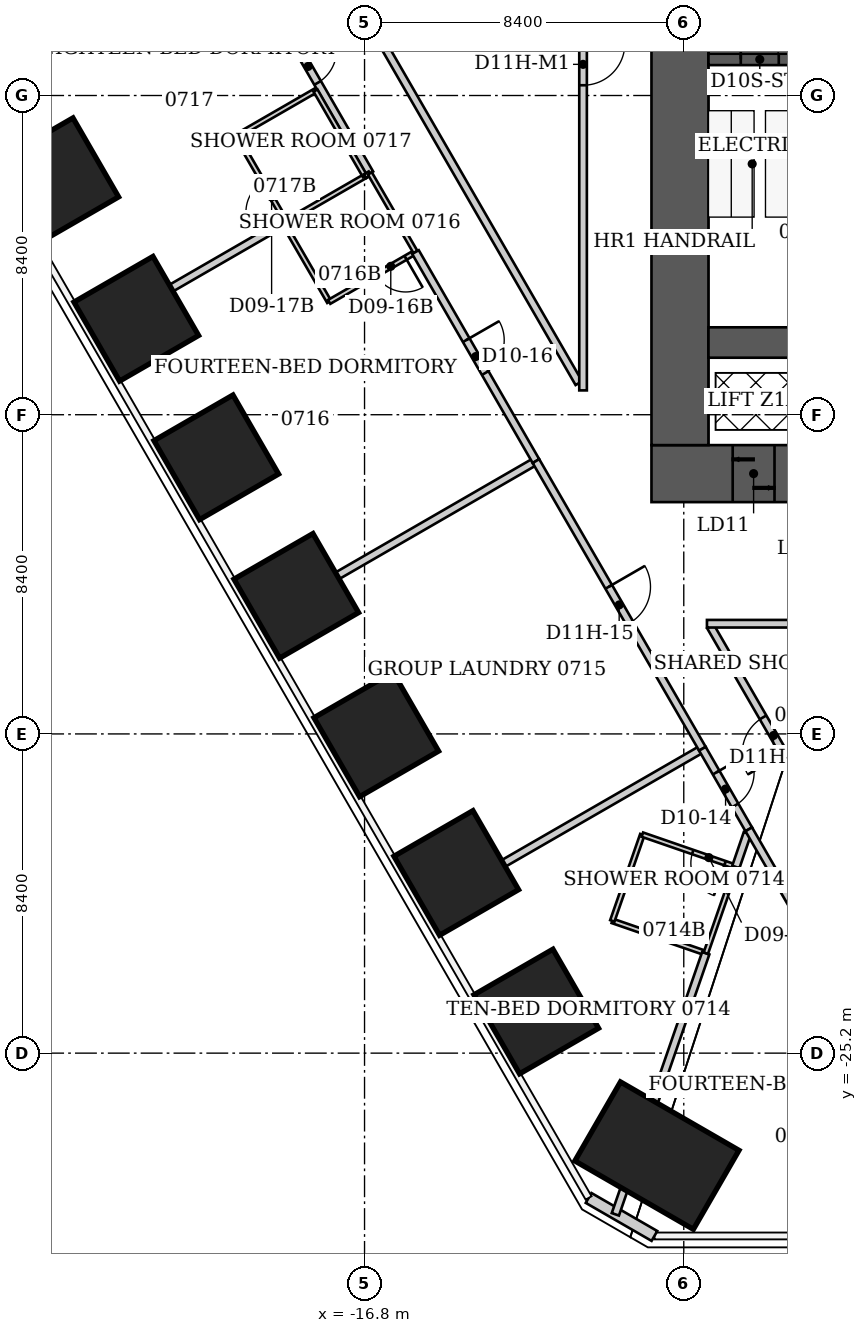
"""IFC4 building model, lengths in metres.
Left out: names, types, materials, properties, quantities, classifications, styles, units other than length and angle.
Written with IfcOpenShell. Run it as: python <this file> out.ifc"""

import sys

from ifc_helpers import new_model, si_unit, direction, frame, frame_2d, origin, origin_2d, place, context, subcontext, project, spatial, rectangle, extrude, element, fill, save


model = new_model("IFC4")
c1 = context("Model", 3, precision=1e-05, world=origin(), true_north=direction((0.0, 1.0)))
c2 = subcontext(c1, "Body", "Model", "MODEL_VIEW")
j1 = project(units=[si_unit("LENGTHUNIT", "METRE"), si_unit("PLANEANGLEUNIT", "RADIAN")], contexts=[c1])
p1 = place(None, origin())
s1 = spatial("IfcSite", under=j1, at=p1, CompositionType="ELEMENT")
p2 = place(p1, origin())
s2 = spatial("IfcBuilding", under=s1, at=p2, CompositionType="ELEMENT")
p3 = place(p2, frame((0.0, 0.0, 34.4)))
s3 = spatial("IfcBuildingStorey", under=s2, at=p3, CompositionType="ELEMENT", Elevation=34.4)
p4 = place(p3, frame((-9.106, -27.897, 0.0), z_axis=(0.0, 0.0, 1.0), x_axis=(-0.5, -0.866025403784, 0.0)))
e1 = element("IfcColumn", 1, at=p4, inside=s3, PredefinedType="COLUMN", context=c2, shape_type="SweptSolid", body=[
    extrude(rectangle(XDim=2.4, YDim=3.6, at=origin_2d()), origin(), (0.0, 0.0, 1.0), 3.8),
])
for number, where, z_axis, x_axis in (
    (2, (-12.282, -24.105, 0.0), (0.0, 0.0, 1.0), (-0.866, -0.5, 0.0)),
    (3, (-14.387, -20.459, 0.0), (0.0, 0.0, 1.0), (-0.866, -0.5, 0.0)),
    (4, (-16.491, -16.813, 0.0), (0.0, 0.0, 1.0), (-0.866, -0.5, 0.0)),
    (5, (-18.596, -13.167, 0.0), (0.0, 0.0, 1.0), (-0.866, -0.5, 0.0)),
    (6, (-20.701, -9.521, 0.0), (0.0, 0.0, 1.0), (-0.866, -0.5, 0.0)),
    (7, (-22.806, -5.875, 0.0), (0.0, 0.0, 1.0), (-0.866, -0.5, 0.0)),
    (8, (-24.911, -2.23, 0.0), (0.0, 0.0, 1.0), (-0.866, -0.5, 0.0)),
):
    element("IfcColumn", number, at=place(p3, frame(where, z_axis=z_axis, x_axis=x_axis)), inside=s3, PredefinedType="COLUMN", context=c2, shape_type="SweptSolid", body=[
        extrude(rectangle(XDim=2.4, YDim=2.4, at=origin_2d()), origin(), (0.0, 0.0, 1.0), 3.8),
    ])
p5 = place(p3, frame((-9.25, -9.95, 0.0), z_axis=(0.0, 0.0, 1.0), x_axis=(1.0, 0.0, 0.0)))
e9 = element("IfcWall", 9, at=p5, inside=s3, PredefinedType="SHEAR", context=c2, shape_type="SweptSolid", body=[
    extrude(rectangle(XDim=18.5, YDim=1.5, at=frame_2d((9.25, 0.0))), origin(), (0.0, 0.0, 1.0), 3.8),
])
p6 = place(p5, frame((2.137, 0.0, 0.0)))
e10 = element("IfcOpeningElement", 10, at=p6, cuts=e9, PredefinedType="OPENING", context=c2, shape_type="SweptSolid", body=[
    extrude(rectangle(XDim=1.1, YDim=2.1, at=frame_2d((0.55, 1.05))), frame((0.0, 0.75, 0.0), z_axis=(0.0, -1.0, 0.0), x_axis=(1.0, 0.0, 0.0)), (0.0, 0.0, 1.0), 1.5),
])
p7 = place(p5, frame((4.762, 0.0, 0.0)))
e11 = element("IfcOpeningElement", 11, at=p7, cuts=e9, PredefinedType="OPENING", context=c2, shape_type="SweptSolid", body=[
    extrude(rectangle(XDim=1.1, YDim=2.1, at=frame_2d((0.55, 1.05))), frame((0.0, 0.75, 0.0), z_axis=(0.0, -1.0, 0.0), x_axis=(1.0, 0.0, 0.0)), (0.0, 0.0, 1.0), 1.5),
])
p8 = place(p5, frame((7.387, 0.0, 0.0)))
e12 = element("IfcOpeningElement", 12, at=p8, cuts=e9, PredefinedType="OPENING", context=c2, shape_type="SweptSolid", body=[
    extrude(rectangle(XDim=1.1, YDim=2.1, at=frame_2d((0.55, 1.05))), frame((0.0, 0.75, 0.0), z_axis=(0.0, -1.0, 0.0), x_axis=(1.0, 0.0, 0.0)), (0.0, 0.0, 1.0), 1.5),
])
p9 = place(p3, frame((-8.5, -9.2, 0.0), z_axis=(0.0, 0.0, 1.0), x_axis=(0.0, 1.0, 0.0)))
e13 = element("IfcWall", 13, at=p9, inside=s3, PredefinedType="SHEAR", context=c2, shape_type="SweptSolid", body=[
    extrude(rectangle(XDim=15.3, YDim=1.5, at=frame_2d((7.65, 0.0))), origin(), (0.0, 0.0, 1.0), 3.8),
])
p10 = place(p9, frame((10.7, 0.0, 0.0)))
e14 = element("IfcOpeningElement", 14, at=p10, cuts=e13, PredefinedType="OPENING", context=c2, shape_type="SweptSolid", body=[
    extrude(rectangle(XDim=1.2, YDim=2.2, at=frame_2d((0.6, 1.1))), frame((0.0, 0.75, 0.0), z_axis=(0.0, -1.0, 0.0), x_axis=(1.0, 0.0, 0.0)), (0.0, 0.0, 1.0), 1.5),
])
p11 = place(p3, frame((-7.75, -6.5, 0.0), z_axis=(0.0, 0.0, 1.0), x_axis=(1.0, 0.0, 0.0)))
e15 = element("IfcWall", 15, at=p11, inside=s3, PredefinedType="SHEAR", context=c2, shape_type="SweptSolid", body=[
    extrude(rectangle(XDim=15.5, YDim=0.8, at=frame_2d((7.75, 0.0))), origin(), (0.0, 0.0, 1.0), 3.8),
])
p12 = place(p3, frame((-7.75, 0.95, 0.0), z_axis=(0.0, 0.0, 1.0), x_axis=(1.0, 0.0, 0.0)))
e16 = element("IfcWall", 16, at=p12, inside=s3, PredefinedType="SHEAR", context=c2, shape_type="SweptSolid", body=[
    extrude(rectangle(XDim=3.0, YDim=0.3, at=frame_2d((1.5, 0.0))), origin(), (0.0, 0.0, 1.0), 3.8),
])
p13 = place(p12, frame((0.85, 0.0, 0.0)))
e17 = element("IfcOpeningElement", 17, at=p13, cuts=e16, PredefinedType="OPENING", context=c2, shape_type="SweptSolid", body=[
    extrude(rectangle(XDim=1.0, YDim=2.2, at=frame_2d((0.5, 1.1))), frame((0.0, 0.15, 0.0), z_axis=(0.0, -1.0, 0.0), x_axis=(1.0, 0.0, 0.0)), (0.0, 0.0, 1.0), 0.3),
])
p14 = place(p3, frame((-9.172, -30.011, 0.0), z_axis=(0.0, 0.0, 1.0), x_axis=(-0.866010750942, 0.50002537861, 0.0)))
e18 = element("IfcWall", 18, at=p14, inside=s3, PredefinedType="SOLIDWALL", context=c2, shape_type="SweptSolid", body=[
    extrude(rectangle(XDim=2.0, YDim=0.3, at=frame_2d((1.0, 0.0))), origin(), (0.0, 0.0, 1.0), 3.64),
])
p15 = place(p3, frame((-23.916, -6.24, 0.0), z_axis=(0.0, 0.0, 1.0), x_axis=(0.865919350456, 0.50018364478, 0.0)))
e19 = element("IfcWall", 19, at=p15, inside=s3, PredefinedType="PARTITIONING", context=c2, shape_type="SweptSolid", body=[
    extrude(rectangle(XDim=5.758, YDim=0.2, at=frame_2d((2.879, 0.0))), origin(), (0.0, 0.0, 1.0), 3.64),
])
p16 = place(p3, frame((-20.17, -1.07, 0.0), z_axis=(0.0, 0.0, 1.0), x_axis=(0.500291685314, -0.865856933682, 0.0)))
e20 = element("IfcWall", 20, at=p16, inside=s3, PredefinedType="PARTITIONING", context=c2, shape_type="SweptSolid", body=[
    extrude(rectangle(XDim=2.599, YDim=0.12, at=frame_2d((1.299, 0.0))), origin(), (0.0, 0.0, 1.0), 3.64),
])
p17 = place(p16, frame((1.399, 0.0, 0.0)))
e21 = element("IfcOpeningElement", 21, at=p17, cuts=e20, PredefinedType="OPENING", context=c2, shape_type="SweptSolid", body=[
    extrude(rectangle(XDim=0.9, YDim=2.03, at=frame_2d((0.45, 1.015))), frame((0.0, 0.06, 0.0), z_axis=(0.0, -1.0, 0.0), x_axis=(1.0, 0.0, 0.0)), (0.0, 0.0, 1.0), 0.12),
])
p18 = place(p3, frame((-19.61, 3.06, 0.0), z_axis=(0.0, 0.0, 1.0), x_axis=(0.499983910424, -0.866034692906, 0.0)))
e22 = element("IfcWall", 22, at=p18, inside=s3, PredefinedType="PARTITIONING", context=c2, shape_type="SweptSolid", body=[
    extrude(rectangle(XDim=5.901, YDim=0.2, at=frame_2d((2.95, 0.0))), origin(), (0.0, 0.0, 1.0), 3.64),
])
p19 = place(p18, frame((2.15, 0.0, 0.0)))
e23 = element("IfcOpeningElement", 23, at=p19, cuts=e22, PredefinedType="OPENING", context=c2, shape_type="SweptSolid", body=[
    extrude(rectangle(XDim=1.0, YDim=2.13, at=frame_2d((0.5, 1.065))), frame((0.0, 0.1, 0.0), z_axis=(0.0, -1.0, 0.0), x_axis=(1.0, 0.0, 0.0)), (0.0, 0.0, 1.0), 0.2),
])
p20 = place(p3, frame((-19.546, -13.81, 0.0), z_axis=(0.0, 0.0, 1.0), x_axis=(0.86599028666, 0.500060819711, 0.0)))
e24 = element("IfcWall", 24, at=p20, inside=s3, PredefinedType="PARTITIONING", context=c2, shape_type="SweptSolid", body=[
    extrude(rectangle(XDim=8.369, YDim=0.2, at=frame_2d((4.185, 0.0))), origin(), (0.0, 0.0, 1.0), 3.038),
])
p21 = place(p3, frame((-18.93, -3.36, 0.0), z_axis=(0.0, 0.0, 1.0), x_axis=(0.501547039172, -0.865130376012, 0.0)))
e25 = element("IfcWall", 25, at=p21, inside=s3, PredefinedType="PARTITIONING", context=c2, shape_type="SweptSolid", body=[
    extrude(rectangle(XDim=2.393, YDim=0.12, at=frame_2d((1.196, 0.0))), origin(), (0.0, 0.0, 1.0), 3.64),
])
p22 = place(p3, frame((-18.868, -3.324, 0.0), z_axis=(0.0, 0.0, 1.0), x_axis=(0.866133109688, 0.499813401482, 0.0)))
e26 = element("IfcWall", 26, at=p22, inside=s3, PredefinedType="PARTITIONING", context=c2, shape_type="SweptSolid", body=[
    extrude(rectangle(XDim=2.401, YDim=0.12, at=frame_2d((1.201, 0.0))), origin(), (0.0, 0.0, 1.0), 3.64),
])
p23 = place(p3, frame((-18.09, 0.13, 0.0), z_axis=(0.0, 0.0, 1.0), x_axis=(-0.866177122335, -0.499737123639, 0.0)))
e27 = element("IfcWall", 27, at=p23, inside=s3, PredefinedType="PARTITIONING", context=c2, shape_type="SweptSolid", body=[
    extrude(rectangle(XDim=2.401, YDim=0.12, at=frame_2d((1.201, 0.0))), origin(), (0.0, 0.0, 1.0), 3.64),
])
p24 = place(p3, frame((-17.73, -5.43, 0.0), z_axis=(0.0, 0.0, 1.0), x_axis=(0.866114241029, 0.499846097802, 0.0)))
e28 = element("IfcWall", 28, at=p24, inside=s3, PredefinedType="PARTITIONING", context=c2, shape_type="SweptSolid", body=[
    extrude(rectangle(XDim=2.621, YDim=0.12, at=frame_2d((1.311, 0.0))), origin(), (0.0, 0.0, 1.0), 2.878),
])
p25 = place(p24, frame((1.421, 0.0, 0.0)))
e29 = element("IfcOpeningElement", 29, at=p25, cuts=e28, PredefinedType="OPENING", context=c2, shape_type="SweptSolid", body=[
    extrude(rectangle(XDim=0.9, YDim=2.03, at=frame_2d((0.45, 1.015))), frame((0.0, 0.06, 0.0), z_axis=(0.0, -1.0, 0.0), x_axis=(1.0, 0.0, 0.0)), (0.0, 0.0, 1.0), 0.12),
])
p26 = place(p3, frame((-16.79, -2.12, 0.0), z_axis=(0.0, 0.0, 1.0), x_axis=(-0.50025099007, 0.865880446098, 0.0)))
e30 = element("IfcWall", 30, at=p26, inside=s3, PredefinedType="PARTITIONING", context=c2, shape_type="SweptSolid", body=[
    extrude(rectangle(XDim=2.599, YDim=0.12, at=frame_2d((1.299, 0.0))), origin(), (0.0, 0.0, 1.0), 3.64),
])
p27 = place(p3, frame((-16.788, -2.124, 0.0), z_axis=(0.0, 0.0, 1.0), x_axis=(0.866405716731, 0.499340699338, 0.0)))
e31 = element("IfcWall", 31, at=p27, inside=s3, PredefinedType="PARTITIONING", context=c2, shape_type="SweptSolid", body=[
    extrude(rectangle(XDim=0.148, YDim=0.12, at=frame_2d((0.074, 0.0))), origin(), (0.0, 0.0, 1.0), 3.64),
])
p28 = place(p3, frame((-16.66, -2.05, 0.0), z_axis=(0.0, 0.0, 1.0), x_axis=(0.501502765098, -0.865156041763, 0.0)))
e32 = element("IfcWall", 32, at=p28, inside=s3, PredefinedType="PARTITIONING", context=c2, shape_type="SweptSolid", body=[
    extrude(rectangle(XDim=2.393, YDim=0.12, at=frame_2d((1.196, 0.0))), origin(), (0.0, 0.0, 1.0), 3.64),
])
p29 = place(p3, frame((-15.46, -4.12, 0.0), z_axis=(0.0, 0.0, 1.0), x_axis=(0.499349514416, -0.866400636226, 0.0)))
e33 = element("IfcWall", 33, at=p29, inside=s3, PredefinedType="PARTITIONING", context=c2, shape_type="SweptSolid", body=[
    extrude(rectangle(XDim=6.348, YDim=0.2, at=frame_2d((3.174, 0.0))), origin(), (0.0, 0.0, 1.0), 3.64),
])
p30 = place(p29, frame((2.674, 0.0, 0.0)))
e34 = element("IfcOpeningElement", 34, at=p30, cuts=e33, PredefinedType="OPENING", context=c2, shape_type="SweptSolid", body=[
    extrude(rectangle(XDim=1.0, YDim=2.13, at=frame_2d((0.5, 1.065))), frame((0.0, 0.1, 0.0), z_axis=(0.0, -1.0, 0.0), x_axis=(1.0, 0.0, 0.0)), (0.0, 0.0, 1.0), 0.2),
])
p31 = place(p3, frame((-15.176, -21.38, 0.0), z_axis=(0.0, 0.0, 1.0), x_axis=(0.866276837306, 0.49956425127, 0.0)))
e35 = element("IfcWall", 35, at=p31, inside=s3, PredefinedType="PARTITIONING", context=c2, shape_type="SweptSolid", body=[
    extrude(rectangle(XDim=8.373, YDim=0.2, at=frame_2d((4.186, 0.0))), origin(), (0.0, 0.0, 1.0), 3.64),
])
p32 = place(p3, frame((-12.29, -9.62, 0.0), z_axis=(0.0, 0.0, 1.0), x_axis=(0.500830481537, -0.86554539382, 0.0)))
e36 = element("IfcWall", 36, at=p32, inside=s3, PredefinedType="PARTITIONING", context=c2, shape_type="SweptSolid", body=[
    extrude(rectangle(XDim=8.746, YDim=0.2, at=frame_2d((4.373, 0.0))), origin(), (0.0, 0.0, 1.0), 3.64),
])
p33 = place(p32, frame((3.823, 0.0, 0.0)))
e37 = element("IfcOpeningElement", 37, at=p33, cuts=e36, PredefinedType="OPENING", context=c2, shape_type="SweptSolid", body=[
    extrude(rectangle(XDim=1.1, YDim=2.2, at=frame_2d((0.55, 1.1))), frame((0.0, 0.1, 0.0), z_axis=(0.0, -1.0, 0.0), x_axis=(1.0, 0.0, 0.0)), (0.0, 0.0, 1.0), 0.2),
])
p34 = place(p3, frame((-11.16, -7.57, 0.0), z_axis=(0.0, 0.0, 1.0), x_axis=(-0.500175206663, 0.865924224537, 0.0)))
e38 = element("IfcWall", 38, at=p34, inside=s3, PredefinedType="PARTITIONING", context=c2, shape_type="SweptSolid", body=[
    extrude(rectangle(XDim=12.275, YDim=0.2, at=frame_2d((6.138, 0.0))), origin(), (0.0, 0.0, 1.0), 3.64),
])
p35 = place(p3, frame((-11.05, 9.4, 0.0), z_axis=(0.0, 0.0, 1.0), x_axis=(0.0, -1.0, 0.0)))
e39 = element("IfcWall", 39, at=p35, inside=s3, PredefinedType="PARTITIONING", context=c2, shape_type="SweptSolid", body=[
    extrude(rectangle(XDim=17.16, YDim=0.2, at=frame_2d((8.58, 0.0))), origin(), (0.0, 0.0, 1.0), 3.64),
])
p36 = place(p35, frame((8.03, 0.0, 0.0)))
e40 = element("IfcOpeningElement", 40, at=p36, cuts=e39, PredefinedType="OPENING", context=c2, shape_type="SweptSolid", body=[
    extrude(rectangle(XDim=1.1, YDim=2.2, at=frame_2d((0.55, 1.1))), frame((0.0, 0.1, 0.0), z_axis=(0.0, -1.0, 0.0), x_axis=(1.0, 0.0, 0.0)), (0.0, 0.0, 1.0), 0.2),
])
p37 = place(p3, frame((-10.28, -21.72, 0.0), z_axis=(0.0, 0.0, 1.0), x_axis=(0.94515546045, -0.326620813149, 0.0)))
e41 = element("IfcWall", 41, at=p37, inside=s3, PredefinedType="PARTITIONING", context=c2, shape_type="SweptSolid", body=[
    extrude(rectangle(XDim=2.603, YDim=0.12, at=frame_2d((1.301, 0.0))), origin(), (0.0, 0.0, 1.0), 3.64),
])
p38 = place(p3, frame((-10.2, -29.442, 0.0), z_axis=(0.0, 0.0, 1.0), x_axis=(0.327154379454, 0.944970905374, 0.0)))
e42 = element("IfcWall", 42, at=p38, inside=s3, PredefinedType="PARTITIONING", context=c2, shape_type="SweptSolid", body=[
    extrude(rectangle(XDim=7.272, YDim=0.2, at=frame_2d((3.636, 0.0))), origin(), (0.0, 0.0, 1.0), 3.64),
])
p39 = place(p3, frame((-9.49, -19.45, 0.0), z_axis=(0.0, 0.0, 1.0), x_axis=(-0.328693963496, -0.944436487203, 0.0)))
e43 = element("IfcWall", 43, at=p39, inside=s3, PredefinedType="PARTITIONING", context=c2, shape_type="SweptSolid", body=[
    extrude(rectangle(XDim=2.404, YDim=0.12, at=frame_2d((1.202, 0.0))), origin(), (0.0, 0.0, 1.0), 3.64),
])
p40 = place(p3, frame((-7.91, -17.19, 0.0), z_axis=(0.0, 0.0, 1.0), x_axis=(0.498748634132, -0.866746675766, 0.0)))
e44 = element("IfcWall", 44, at=p40, inside=s3, PredefinedType="PARTITIONING", context=c2, shape_type="SweptSolid", body=[
    extrude(rectangle(XDim=2.446, YDim=0.2, at=frame_2d((1.223, 0.0))), origin(), (0.0, 0.0, 1.0), 3.64),
])
p41 = place(p40, frame((0.723, 0.0, 0.0)))
e45 = element("IfcOpeningElement", 45, at=p41, cuts=e44, PredefinedType="OPENING", context=c2, shape_type="SweptSolid", body=[
    extrude(rectangle(XDim=1.0, YDim=2.13, at=frame_2d((0.5, 1.065))), frame((0.0, 0.1, 0.0), z_axis=(0.0, -1.0, 0.0), x_axis=(1.0, 0.0, 0.0)), (0.0, 0.0, 1.0), 0.2),
])
p42 = place(p3, frame((-7.82, -22.57, 0.0), z_axis=(0.0, 0.0, 1.0), x_axis=(0.328693963496, 0.944436487203, 0.0)))
e46 = element("IfcWall", 46, at=p42, inside=s3, PredefinedType="PARTITIONING", context=c2, shape_type="SweptSolid", body=[
    extrude(rectangle(XDim=2.404, YDim=0.12, at=frame_2d((1.202, 0.0))), origin(), (0.0, 0.0, 1.0), 3.64),
])
p43 = place(p3, frame((-7.03, -20.3, 0.0), z_axis=(0.0, 0.0, 1.0), x_axis=(-0.94515546045, 0.326620813149, 0.0)))
e47 = element("IfcWall", 47, at=p43, inside=s3, PredefinedType="PARTITIONING", context=c2, shape_type="SweptSolid", body=[
    extrude(rectangle(XDim=2.603, YDim=0.12, at=frame_2d((1.301, 0.0))), origin(), (0.0, 0.0, 1.0), 3.64),
])
p44 = place(p43, frame((0.3, 0.0, 0.0)))
e48 = element("IfcOpeningElement", 48, at=p44, cuts=e47, PredefinedType="OPENING", context=c2, shape_type="SweptSolid", body=[
    extrude(rectangle(XDim=0.9, YDim=2.03, at=frame_2d((0.45, 1.015))), frame((0.0, 0.06, 0.0), z_axis=(0.0, -1.0, 0.0), x_axis=(1.0, 0.0, 0.0)), (0.0, 0.0, 1.0), 0.12),
])
p45 = place(p3, frame((-7.03, -20.3, 0.0), z_axis=(0.0, 0.0, 1.0), x_axis=(0.324737408014, 0.94580421644, 0.0)))
e49 = element("IfcWall", 49, at=p45, inside=s3, PredefinedType="PARTITIONING", context=c2, shape_type="SweptSolid", body=[
    extrude(rectangle(XDim=0.937, YDim=0.2, at=frame_2d((0.468, 0.0))), origin(), (0.0, 0.0, 1.0), 3.64),
])
p46 = place(p3, frame((-6.69, -19.31, 0.0), z_axis=(0.0, 0.0, 1.0), x_axis=(0.499963722229, -0.866046347752, 0.0)))
e50 = element("IfcWall", 50, at=p46, inside=s3, PredefinedType="PARTITIONING", context=c2, shape_type="SweptSolid", body=[
    extrude(rectangle(XDim=2.54, YDim=0.2, at=frame_2d((1.27, 0.0))), origin(), (0.0, 0.0, 1.0), 3.64),
])
p47 = place(p3, frame((-4.38, -19.71, 0.0), z_axis=(0.0, 0.0, 1.0), x_axis=(-0.500523653757, 0.865722860984, 0.0)))
e51 = element("IfcWall", 51, at=p47, inside=s3, PredefinedType="PARTITIONING", context=c2, shape_type="SweptSolid", body=[
    extrude(rectangle(XDim=6.628, YDim=0.2, at=frame_2d((3.314, 0.0))), origin(), (0.0, 0.0, 1.0), 3.64),
])
p48 = place(p47, frame((2.764, 0.0, 0.0)))
e52 = element("IfcOpeningElement", 52, at=p48, cuts=e51, PredefinedType="OPENING", context=c2, shape_type="SweptSolid", body=[
    extrude(rectangle(XDim=1.1, YDim=2.2, at=frame_2d((0.55, 1.1))), frame((0.0, 0.1, 0.0), z_axis=(0.0, -1.0, 0.0), x_axis=(1.0, 0.0, 0.0)), (0.0, 0.0, 1.0), 0.2),
])
p49 = place(p3, frame((0.18, -13.9, 0.0), z_axis=(0.0, 0.0, 1.0), x_axis=(-1.0, 0.0, 0.0)))
e53 = element("IfcWall", 53, at=p49, inside=s3, PredefinedType="PARTITIONING", context=c2, shape_type="SweptSolid", body=[
    extrude(rectangle(XDim=7.97, YDim=0.2, at=frame_2d((3.985, 0.0))), origin(), (0.0, 0.0, 1.0), 3.64),
])
p50 = place(p49, frame((3.035, 0.0, 0.0)))
e54 = element("IfcOpeningElement", 54, at=p50, cuts=e53, PredefinedType="OPENING", context=c2, shape_type="SweptSolid", body=[
    extrude(rectangle(XDim=1.1, YDim=2.2, at=frame_2d((0.55, 1.1))), frame((0.0, 0.1, 0.0), z_axis=(0.0, -1.0, 0.0), x_axis=(1.0, 0.0, 0.0)), (0.0, 0.0, 1.0), 0.2),
])
p51 = place(p41, origin())
e55 = element("IfcDoor", 55, at=p51, inside=s3, OperationType="SINGLE_SWING_LEFT", PredefinedType="DOOR", context=c2, shape_type="SweptSolid", body=[
    extrude(rectangle(XDim=1.0, YDim=2.13, at=frame_2d((0.5, 1.065))), frame((0.0, 0.025, 0.0), z_axis=(0.0, -1.0, 0.0), x_axis=(1.0, 0.0, 0.0)), (0.0, 0.0, 1.0), 0.05),
])
fill(e45, e55)
p52 = place(p44, origin())
e56 = element("IfcDoor", 56, at=p52, inside=s3, OperationType="SINGLE_SWING_LEFT", PredefinedType="DOOR", context=c2, shape_type="SweptSolid", body=[
    extrude(rectangle(XDim=0.9, YDim=2.03, at=frame_2d((0.45, 1.015))), frame((0.0, 0.025, 0.0), z_axis=(0.0, -1.0, 0.0), x_axis=(1.0, 0.0, 0.0)), (0.0, 0.0, 1.0), 0.05),
])
fill(e48, e56)
p53 = place(p33, origin())
e57 = element("IfcDoor", 57, at=p53, inside=s3, OperationType="SINGLE_SWING_LEFT", PredefinedType="DOOR", context=c2, shape_type="SweptSolid", body=[
    extrude(rectangle(XDim=1.1, YDim=2.2, at=frame_2d((0.55, 1.1))), frame((0.0, 0.025, 0.0), z_axis=(0.0, -1.0, 0.0), x_axis=(1.0, 0.0, 0.0)), (0.0, 0.0, 1.0), 0.05),
])
fill(e37, e57)
p54 = place(p30, origin())
e58 = element("IfcDoor", 58, at=p54, inside=s3, OperationType="SINGLE_SWING_LEFT", PredefinedType="DOOR", context=c2, shape_type="SweptSolid", body=[
    extrude(rectangle(XDim=1.0, YDim=2.13, at=frame_2d((0.5, 1.065))), frame((0.0, 0.025, 0.0), z_axis=(0.0, -1.0, 0.0), x_axis=(1.0, 0.0, 0.0)), (0.0, 0.0, 1.0), 0.05),
])
fill(e34, e58)
p55 = place(p25, origin())
e59 = element("IfcDoor", 59, at=p55, inside=s3, OperationType="SINGLE_SWING_RIGHT", PredefinedType="DOOR", context=c2, shape_type="SweptSolid", body=[
    extrude(rectangle(XDim=0.9, YDim=2.03, at=frame_2d((0.45, 1.015))), frame((0.0, 0.025, 0.0), z_axis=(0.0, -1.0, 0.0), x_axis=(1.0, 0.0, 0.0)), (0.0, 0.0, 1.0), 0.05),
])
fill(e29, e59)
p56 = place(p19, origin())
e60 = element("IfcDoor", 60, at=p56, inside=s3, OperationType="SINGLE_SWING_LEFT", PredefinedType="DOOR", context=c2, shape_type="SweptSolid", body=[
    extrude(rectangle(XDim=1.0, YDim=2.13, at=frame_2d((0.5, 1.065))), frame((0.0, 0.025, 0.0), z_axis=(0.0, -1.0, 0.0), x_axis=(1.0, 0.0, 0.0)), (0.0, 0.0, 1.0), 0.05),
])
fill(e23, e60)
p57 = place(p17, origin())
e61 = element("IfcDoor", 61, at=p57, inside=s3, OperationType="SINGLE_SWING_RIGHT", PredefinedType="DOOR", context=c2, shape_type="SweptSolid", body=[
    extrude(rectangle(XDim=0.9, YDim=2.03, at=frame_2d((0.45, 1.015))), frame((0.0, 0.025, 0.0), z_axis=(0.0, -1.0, 0.0), x_axis=(1.0, 0.0, 0.0)), (0.0, 0.0, 1.0), 0.05),
])
fill(e21, e61)
p58 = place(p48, origin())
e62 = element("IfcDoor", 62, at=p58, inside=s3, OperationType="SINGLE_SWING_LEFT", PredefinedType="DOOR", context=c2, shape_type="SweptSolid", body=[
    extrude(rectangle(XDim=1.1, YDim=2.2, at=frame_2d((0.55, 1.1))), frame((0.0, 0.025, 0.0), z_axis=(0.0, -1.0, 0.0), x_axis=(1.0, 0.0, 0.0)), (0.0, 0.0, 1.0), 0.05),
])
fill(e52, e62)
p59 = place(p36, origin())
e63 = element("IfcDoor", 63, at=p59, inside=s3, OperationType="SINGLE_SWING_LEFT", PredefinedType="DOOR", context=c2, shape_type="SweptSolid", body=[
    extrude(rectangle(XDim=1.1, YDim=2.2, at=frame_2d((0.55, 1.1))), frame((0.0, 0.025, 0.0), z_axis=(0.0, -1.0, 0.0), x_axis=(1.0, 0.0, 0.0)), (0.0, 0.0, 1.0), 0.05),
])
fill(e40, e63)
p60 = place(p13, origin())
e64 = element("IfcDoor", 64, at=p60, inside=s3, OperationType="SINGLE_SWING_LEFT", PredefinedType="DOOR", context=c2, shape_type="SweptSolid", body=[
    extrude(rectangle(XDim=1.0, YDim=2.2, at=frame_2d((0.5, 1.1))), frame((0.0, 0.025, 0.0), z_axis=(0.0, -1.0, 0.0), x_axis=(1.0, 0.0, 0.0)), (0.0, 0.0, 1.0), 0.05),
])
fill(e17, e64)
p61 = place(p6, origin())
e65 = element("IfcDoor", 65, at=p61, inside=s3, OperationType="DOUBLE_DOOR_SLIDING", PredefinedType="DOOR", context=c2, shape_type="SweptSolid", body=[
    extrude(rectangle(XDim=1.1, YDim=2.1, at=frame_2d((0.55, 1.05))), frame((0.0, 0.025, 0.0), z_axis=(0.0, -1.0, 0.0), x_axis=(1.0, 0.0, 0.0)), (0.0, 0.0, 1.0), 0.05),
])
fill(e10, e65)
save(model, sys.argv[1])
